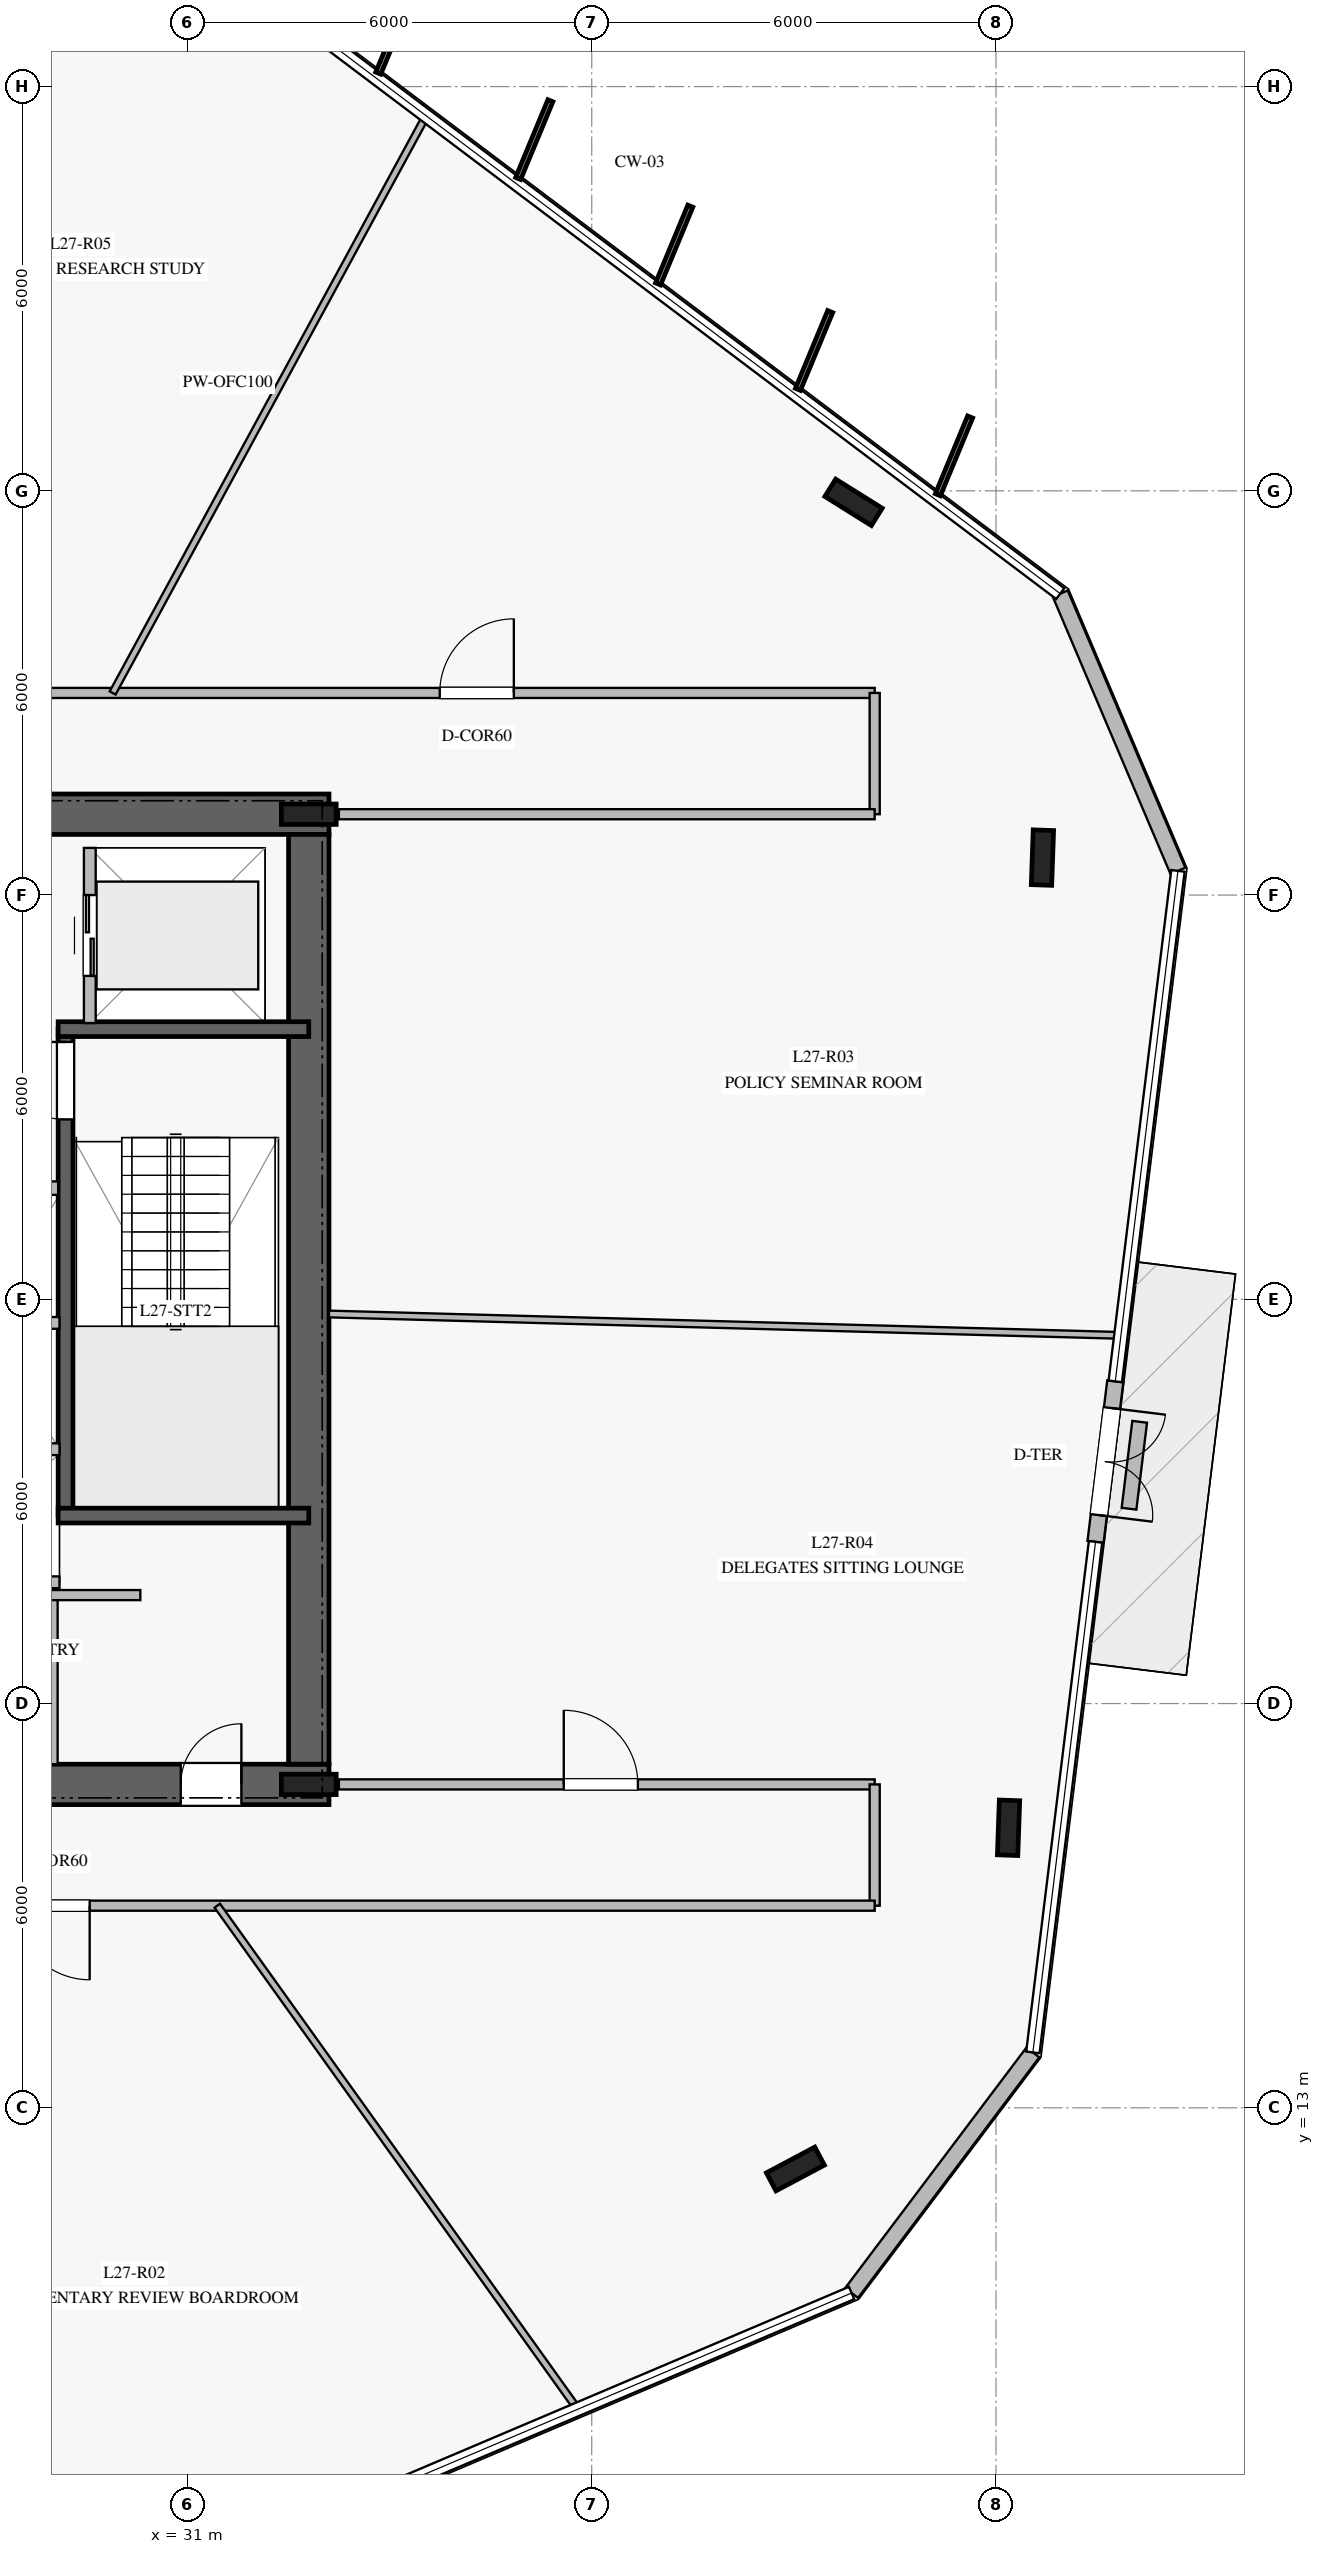
"""IFC4 building model, lengths in metres.
Left out: names, types, materials, properties, quantities, classifications, styles, units other than length and angle.
Written with IfcOpenShell. Run it as: python <this file> out.ifc"""

import sys

from ifc_helpers import new_model, si_unit, direction, frame, frame_2d, origin, origin_2d, place, context, subcontext, project, spatial, rectangle, i_section, extrude, element, fill, save


model = new_model("IFC4")
c1 = context("Model", 3, precision=1e-05, world=origin(), true_north=direction((0.0, 1.0)))
c2 = subcontext(c1, "Body", "Model", "MODEL_VIEW")
j1 = project(units=[si_unit("LENGTHUNIT", "METRE"), si_unit("PLANEANGLEUNIT", "RADIAN")], contexts=[c1])
p1 = place(None, origin())
s1 = spatial("IfcSite", under=j1, at=p1, CompositionType="ELEMENT")
p2 = place(p1, origin())
s2 = spatial("IfcBuilding", under=s1, at=p2, CompositionType="ELEMENT")
p3 = place(p2, frame((0.0, 0.0, 114.4)))
s3 = spatial("IfcBuildingStorey", under=s2, at=p3, CompositionType="ELEMENT", Elevation=114.4)
p4 = place(p3, frame((16.9, 17.8, 0.0), z_axis=(0.0, 0.0, 1.0), x_axis=(1.0, 0.0, 0.0)))
e1 = element("IfcWall", 1, at=p4, inside=s3, PredefinedType="SHEAR", context=c2, shape_type="SweptSolid", body=[
    extrude(rectangle(XDim=16.2, YDim=0.6, at=frame_2d((8.1, 0.0))), origin(), (0.0, 0.0, 1.0), 3.76),
])
p5 = place(p4, frame((5.05, 0.0, 0.0)))
e2 = element("IfcOpeningElement", 2, at=p5, cuts=e1, PredefinedType="OPENING", context=c2, shape_type="SweptSolid", body=[
    extrude(rectangle(XDim=1.2, YDim=2.25, at=frame_2d((0.6, 1.125))), frame((0.0, 0.31, 0.0), z_axis=(0.0, -1.0, 0.0), x_axis=(1.0, 0.0, 0.0)), (0.0, 0.0, 1.0), 0.62),
])
p6 = place(p4, frame((14.0, 0.0, 0.0)))
e3 = element("IfcOpeningElement", 3, at=p6, cuts=e1, PredefinedType="OPENING", context=c2, shape_type="SweptSolid", body=[
    extrude(rectangle(XDim=0.9, YDim=2.1, at=frame_2d((0.45, 1.05))), frame((0.0, 0.31, 0.0), z_axis=(0.0, -1.0, 0.0), x_axis=(1.0, 0.0, 0.0)), (0.0, 0.0, 1.0), 0.62),
])
p7 = place(p4, frame((9.25, 0.0, 0.0)))
e4 = element("IfcOpeningElement", 4, at=p7, cuts=e1, PredefinedType="OPENING", context=c2, shape_type="SweptSolid", body=[
    extrude(rectangle(XDim=1.1, YDim=2.2, at=frame_2d((0.55, 1.1))), frame((0.0, 0.31, 0.0), z_axis=(0.0, -1.0, 0.0), x_axis=(1.0, 0.0, 0.0)), (0.0, 0.0, 1.0), 0.62),
])
p8 = place(p3, frame((33.1, 32.2, 0.0), z_axis=(0.0, 0.0, 1.0), x_axis=(-1.0, 0.0, 0.0)))
e5 = element("IfcWall", 5, at=p8, inside=s3, PredefinedType="SHEAR", context=c2, shape_type="SweptSolid", body=[
    extrude(rectangle(XDim=16.2, YDim=0.6, at=frame_2d((8.1, 0.0))), origin(), (0.0, 0.0, 1.0), 3.76),
])
p9 = place(p8, frame((5.05, 0.0, 0.0)))
e6 = element("IfcOpeningElement", 6, at=p9, cuts=e5, PredefinedType="OPENING", context=c2, shape_type="SweptSolid", body=[
    extrude(rectangle(XDim=1.2, YDim=2.25, at=frame_2d((0.6, 1.125))), frame((0.0, 0.31, 0.0), z_axis=(0.0, -1.0, 0.0), x_axis=(1.0, 0.0, 0.0)), (0.0, 0.0, 1.0), 0.62),
])
p10 = place(p8, frame((11.85, 0.0, 0.0)))
e7 = element("IfcOpeningElement", 7, at=p10, cuts=e5, PredefinedType="OPENING", context=c2, shape_type="SweptSolid", body=[
    extrude(rectangle(XDim=1.1, YDim=2.2, at=frame_2d((0.55, 1.1))), frame((0.0, 0.31, 0.0), z_axis=(0.0, -1.0, 0.0), x_axis=(1.0, 0.0, 0.0)), (0.0, 0.0, 1.0), 0.62),
])
p11 = place(p8, frame((9.875, 0.0, 0.0)))
e8 = element("IfcOpeningElement", 8, at=p11, cuts=e5, PredefinedType="OPENING", context=c2, shape_type="SweptSolid", body=[
    extrude(rectangle(XDim=1.1, YDim=2.2, at=frame_2d((0.55, 1.1))), frame((0.0, 0.31, 0.0), z_axis=(0.0, -1.0, 0.0), x_axis=(1.0, 0.0, 0.0)), (0.0, 0.0, 1.0), 0.62),
])
p12 = place(p8, frame((7.9, 0.0, 0.0)))
e9 = element("IfcOpeningElement", 9, at=p12, cuts=e5, PredefinedType="OPENING", context=c2, shape_type="SweptSolid", body=[
    extrude(rectangle(XDim=1.1, YDim=2.2, at=frame_2d((0.55, 1.1))), frame((0.0, 0.31, 0.0), z_axis=(0.0, -1.0, 0.0), x_axis=(1.0, 0.0, 0.0)), (0.0, 0.0, 1.0), 0.62),
])
p13 = place(p3, frame((32.8, 18.1, 0.0), z_axis=(0.0, 0.0, 1.0), x_axis=(0.0, 1.0, 0.0)))
e10 = element("IfcWall", 10, at=p13, inside=s3, PredefinedType="SHEAR", context=c2, shape_type="SweptSolid", body=[
    extrude(rectangle(XDim=13.8, YDim=0.6, at=frame_2d((6.9, 0.0))), origin(), (0.0, 0.0, 1.0), 3.76),
])
for number, where, z_axis, x_axis in (
    (11, (32.8, 17.8, 0.0), (0.0, 0.0, 1.0), (1.0, 0.0, 0.0)),
    (12, (32.8, 32.2, 0.0), (0.0, 0.0, 1.0), (1.0, 0.0, 0.0)),
):
    element("IfcColumn", number, at=place(p3, frame(where, z_axis=z_axis, x_axis=x_axis)), inside=s3, PredefinedType="COLUMN", context=c2, shape_type="SweptSolid", body=[
        extrude(i_section(OverallWidth=0.303, OverallDepth=0.814, WebThickness=0.021, FlangeThickness=0.04, at=origin_2d()), origin(), (0.0, 0.0, 1.0), 4.0),
    ])
p14 = place(p3, frame((29.19, 21.79, 0.0), z_axis=(0.0, 0.0, 1.0), x_axis=(0.0, 1.0, 0.0)))
e13 = element("IfcWall", 13, at=p14, inside=s3, PredefinedType="SOLIDWALL", context=c2, shape_type="SweptSolid", body=[
    extrude(rectangle(XDim=7.22, YDim=0.22, at=frame_2d((3.61, 0.0))), origin(), (0.0, 0.0, 1.0), 3.76),
])
p15 = place(p14, frame((5.88, 0.0, 0.0)))
e14 = element("IfcOpeningElement", 14, at=p15, cuts=e13, PredefinedType="OPENING", context=c2, shape_type="SweptSolid", body=[
    extrude(rectangle(XDim=1.15, YDim=2.2, at=frame_2d((0.575, 1.1))), frame((0.0, 0.12, 0.0), z_axis=(0.0, -1.0, 0.0), x_axis=(1.0, 0.0, 0.0)), (0.0, 0.0, 1.0), 0.24),
])
for number, where, z_axis, x_axis in (
    (15, (29.08, 21.79, 0.0), (0.0, 0.0, 1.0), (1.0, 0.0, 0.0)),
    (16, (29.08, 29.01, 0.0), (0.0, 0.0, 1.0), (1.0, 0.0, 0.0)),
):
    element("IfcWall", number, at=place(p3, frame(where, z_axis=z_axis, x_axis=x_axis)), inside=s3, PredefinedType="SOLIDWALL", context=c2, shape_type="SweptSolid", body=[
        extrude(rectangle(XDim=3.72, YDim=0.22, at=frame_2d((1.86, 0.0))), origin(), (0.0, 0.0, 1.0), 3.76),
    ])
for number, where, z_axis, x_axis in (
    (17, (40.886, 36.829, 0.0), (0.0, 0.0, 1.0), (-0.848, 0.53, 0.0)),
    (18, (40.023, 12.092, 0.0), (0.0, 0.0, 1.0), (0.883, 0.469, 0.0)),
    (19, (43.187, 17.156, 0.0), (0.0, 0.0, 1.0), (0.035, 0.999, 0.0)),
    (20, (43.69, 31.556, 0.0), (0.0, 0.0, 1.0), (0.035, 0.999, 0.0)),
):
    element("IfcColumn", number, at=place(p3, frame(where, z_axis=z_axis, x_axis=x_axis)), inside=s3, PredefinedType="COLUMN", context=c2, shape_type="SweptSolid", body=[
        extrude(i_section(OverallWidth=0.303, OverallDepth=0.814, WebThickness=0.021, FlangeThickness=0.04, at=origin_2d()), origin(), (0.0, 0.0, 1.0), 4.0),
    ])
p16 = place(p3, frame((40.857, 10.251, 0.0), z_axis=(0.0, 0.0, 1.0), x_axis=(0.601841660076, 0.798615436989, 0.0)))
e21 = element("IfcWall", 21, at=p16, inside=s3, PredefinedType="STANDARD", context=c2, shape_type="SweptSolid", body=[
    extrude(rectangle(XDim=4.471, YDim=0.24, at=frame_2d((2.236, 0.0))), origin(), (0.0, 0.0, 1.0), 3.76),
])
p17 = place(p3, frame((44.478, 21.4, 0.0), z_axis=(0.0, 0.0, 1.0), x_axis=(0.122068869435, 0.992521632568, 0.0)))
e22 = element("IfcWall", 22, at=p17, inside=s3, PredefinedType="STANDARD", context=c2, shape_type="SweptSolid", body=[
    extrude(rectangle(XDim=2.4, YDim=0.24, at=frame_2d((1.2, 0.0))), origin(), (0.0, 0.0, 1.0), 3.76),
])
p18 = place(p17, frame((0.4, 0.0, 0.0)))
e23 = element("IfcOpeningElement", 23, at=p18, cuts=e22, PredefinedType="OPENING", context=c2, shape_type="SweptSolid", body=[
    extrude(rectangle(XDim=1.6, YDim=2.25, at=frame_2d((0.8, 1.125))), frame((0.0, 0.13, 0.0), z_axis=(0.0, -1.0, 0.0), x_axis=(1.0, 0.0, 0.0)), (0.0, 0.0, 1.0), 0.26),
])
p19 = place(p3, frame((45.701, 31.359, 0.0), z_axis=(0.0, 0.0, 1.0), x_axis=(-0.390733557702, 0.920503822309, 0.0)))
e24 = element("IfcWall", 24, at=p19, inside=s3, PredefinedType="STANDARD", context=c2, shape_type="SweptSolid", body=[
    extrude(rectangle(XDim=4.471, YDim=0.24, at=frame_2d((2.235, 0.0))), origin(), (0.0, 0.0, 1.0), 3.76),
])
p20 = place(p3, frame((44.975, 21.892, 0.0), z_axis=(0.0, 0.0, 1.0), x_axis=(0.121560078921, 0.992584075639, 0.0)))
e25 = element("IfcWall", 25, at=p20, inside=s3, PredefinedType="USERDEFINED", context=c2, shape_type="SweptSolid", body=[
    extrude(rectangle(XDim=1.299, YDim=0.22, at=frame_2d((0.65, 0.0))), origin(), (0.0, 0.0, 1.0), 0.4),
])
p21 = place(p3, frame((25.7, 26.65, 0.0), z_axis=(0.0, 0.0, 1.0), x_axis=(1.0, 0.0, 0.0)))
e26 = element("IfcWall", 26, at=p21, inside=s3, PredefinedType="PARTITIONING", context=c2, shape_type="SweptSolid", body=[
    extrude(rectangle(XDim=3.38, YDim=0.2, at=frame_2d((1.69, 0.0))), origin(), (0.0, 0.0, 1.0), 3.76),
])
p22 = place(p3, frame((29.01, 18.1, 0.0), z_axis=(0.0, 0.0, 1.0), x_axis=(0.0, 1.0, 0.0)))
e27 = element("IfcWall", 27, at=p22, inside=s3, PredefinedType="PARTITIONING", context=c2, shape_type="SweptSolid", body=[
    extrude(rectangle(XDim=2.45, YDim=0.125, at=frame_2d((1.225, 0.0))), origin(), (0.0, 0.0, 1.0), 3.76),
])
p23 = place(p3, frame((24.4, 20.61, 0.0), z_axis=(0.0, 0.0, 1.0), x_axis=(1.0, 0.0, 0.0)))
e28 = element("IfcWall", 28, at=p23, inside=s3, PredefinedType="PARTITIONING", context=c2, shape_type="SweptSolid", body=[
    extrude(rectangle(XDim=5.9, YDim=0.15, at=frame_2d((2.95, 0.0))), origin(), (0.0, 0.0, 1.0), 3.76),
])
for number, where, z_axis, x_axis in (
    (29, (26.75, 20.8, 0.0), (0.0, 0.0, 1.0), (1.0, 0.0, 0.0)),
    (30, (26.75, 22.775, 0.0), (0.0, 0.0, 1.0), (1.0, 0.0, 0.0)),
    (31, (26.75, 24.65, 0.0), (0.0, 0.0, 1.0), (1.0, 0.0, 0.0)),
):
    element("IfcWall", number, at=place(p3, frame(where, z_axis=z_axis, x_axis=x_axis)), inside=s3, PredefinedType="PARTITIONING", context=c2, shape_type="SweptSolid", body=[
        extrude(rectangle(XDim=2.35, YDim=0.175, at=frame_2d((1.175, 0.0))), origin(), (0.0, 0.0, 1.0), 3.76),
    ])
p24 = place(p3, frame((29.55, 29.1, 0.0), z_axis=(0.0, 0.0, 1.0), x_axis=(0.0, 1.0, 0.0)))
e32 = element("IfcWall", 32, at=p24, inside=s3, PredefinedType="PARTITIONING", context=c2, shape_type="SweptSolid", body=[
    extrude(rectangle(XDim=2.6, YDim=0.175, at=frame_2d((1.3, 0.0))), origin(), (0.0, 0.0, 1.0), 3.76),
])
p25 = place(p24, frame((0.7, 0.0, 0.0)))
e33 = element("IfcOpeningElement", 33, at=p25, cuts=e32, PredefinedType="OPENING", context=c2, shape_type="SweptSolid", body=[
    extrude(rectangle(XDim=1.2, YDim=2.2, at=frame_2d((0.6, 1.1))), frame((0.0, 0.098, 0.0), z_axis=(0.0, -1.0, 0.0), x_axis=(1.0, 0.0, 0.0)), (0.0, 0.0, 1.0), 0.195),
])
p26 = place(p3, frame((25.95, 34.0, 0.0), z_axis=(0.0, 0.0, 1.0), x_axis=(1.0, 0.0, 0.0)))
e34 = element("IfcWall", 34, at=p26, inside=s3, PredefinedType="PARTITIONING", context=c2, shape_type="SweptSolid", body=[
    extrude(rectangle(XDim=15.25, YDim=0.15, at=frame_2d((7.625, 0.0))), origin(), (0.0, 0.0, 1.0), 3.21),
])
p27 = place(p26, frame((8.794, 0.0, 0.0)))
e35 = element("IfcOpeningElement", 35, at=p27, cuts=e34, PredefinedType="OPENING", context=c2, shape_type="SweptSolid", body=[
    extrude(rectangle(XDim=1.1, YDim=2.2, at=frame_2d((0.55, 1.1))), frame((0.0, 0.085, 0.0), z_axis=(0.0, -1.0, 0.0), x_axis=(1.0, 0.0, 0.0)), (0.0, 0.0, 1.0), 0.17),
])
p28 = place(p3, frame((41.2, 34.0, 0.0), z_axis=(0.0, 0.0, 1.0), x_axis=(0.0, -1.0, 0.0)))
e36 = element("IfcWall", 36, at=p28, inside=s3, PredefinedType="PARTITIONING", context=c2, shape_type="SweptSolid", body=[
    extrude(rectangle(XDim=1.8, YDim=0.15, at=frame_2d((0.9, 0.0))), origin(), (0.0, 0.0, 1.0), 3.76),
])
p29 = place(p3, frame((41.2, 32.2, 0.0), z_axis=(0.0, 0.0, 1.0), x_axis=(-1.0, 0.0, 0.0)))
e37 = element("IfcWall", 37, at=p29, inside=s3, PredefinedType="PARTITIONING", context=c2, shape_type="SweptSolid", body=[
    extrude(rectangle(XDim=7.953, YDim=0.15, at=frame_2d((3.977, 0.0))), origin(), (0.0, 0.0, 1.0), 3.21),
])
p30 = place(p3, frame((33.247, 17.8, 0.0), z_axis=(0.0, 0.0, 1.0), x_axis=(1.0, 0.0, 0.0)))
e38 = element("IfcWall", 38, at=p30, inside=s3, PredefinedType="PARTITIONING", context=c2, shape_type="SweptSolid", body=[
    extrude(rectangle(XDim=7.953, YDim=0.15, at=frame_2d((3.977, 0.0))), origin(), (0.0, 0.0, 1.0), 3.05),
])
p31 = place(p30, frame((3.338, 0.0, 0.0)))
e39 = element("IfcOpeningElement", 39, at=p31, cuts=e38, PredefinedType="OPENING", context=c2, shape_type="SweptSolid", body=[
    extrude(rectangle(XDim=1.1, YDim=2.2, at=frame_2d((0.55, 1.1))), frame((0.0, 0.085, 0.0), z_axis=(0.0, -1.0, 0.0), x_axis=(1.0, 0.0, 0.0)), (0.0, 0.0, 1.0), 0.17),
])
p32 = place(p3, frame((41.2, 17.8, 0.0), z_axis=(0.0, 0.0, 1.0), x_axis=(0.0, -1.0, 0.0)))
e40 = element("IfcWall", 40, at=p32, inside=s3, PredefinedType="PARTITIONING", context=c2, shape_type="SweptSolid", body=[
    extrude(rectangle(XDim=1.8, YDim=0.15, at=frame_2d((0.9, 0.0))), origin(), (0.0, 0.0, 1.0), 3.21),
])
p33 = place(p3, frame((41.2, 16.0, 0.0), z_axis=(0.0, 0.0, 1.0), x_axis=(-1.0, 0.0, 0.0)))
e41 = element("IfcWall", 41, at=p33, inside=s3, PredefinedType="PARTITIONING", context=c2, shape_type="SweptSolid", body=[
    extrude(rectangle(XDim=15.25, YDim=0.15, at=frame_2d((7.625, 0.0))), origin(), (0.0, 0.0, 1.0), 3.21),
])
p34 = place(p33, frame((11.652, 0.0, 0.0)))
e42 = element("IfcOpeningElement", 42, at=p34, cuts=e41, PredefinedType="OPENING", context=c2, shape_type="SweptSolid", body=[
    extrude(rectangle(XDim=1.1, YDim=2.2, at=frame_2d((0.55, 1.1))), frame((0.0, 0.085, 0.0), z_axis=(0.0, -1.0, 0.0), x_axis=(1.0, 0.0, 0.0)), (0.0, 0.0, 1.0), 0.17),
])
p35 = place(p3, frame((29.889, 34.0, 0.0), z_axis=(0.0, 0.0, 1.0), x_axis=(0.477332684536, 0.878722657199, 0.0)))
e43 = element("IfcWall", 43, at=p35, inside=s3, PredefinedType="MOVABLE", context=c2, shape_type="SweptSolid", body=[
    extrude(rectangle(XDim=9.731, YDim=0.1, at=frame_2d((4.866, 0.0))), origin(), (0.0, 0.0, 1.0), 3.16),
])
p36 = place(p3, frame((31.442, 16.0, 0.0), z_axis=(0.0, 0.0, 1.0), x_axis=(0.582000725821, -0.813188265498, 0.0)))
e44 = element("IfcWall", 44, at=p36, inside=s3, PredefinedType="MOVABLE", context=c2, shape_type="SweptSolid", body=[
    extrude(rectangle(XDim=9.174, YDim=0.1, at=frame_2d((4.587, 0.0))), origin(), (0.0, 0.0, 1.0), 3.02),
])
p37 = place(p3, frame((33.1, 24.782, 0.0), z_axis=(0.0, 0.0, 1.0), x_axis=(0.999635698047, -0.026990205435, 0.0)))
e45 = element("IfcWall", 45, at=p37, inside=s3, PredefinedType="MOVABLE", context=c2, shape_type="SweptSolid", body=[
    extrude(rectangle(XDim=11.741, YDim=0.1, at=frame_2d((5.871, 0.0))), origin(), (0.0, 0.0, 1.0), 3.05),
])
p38 = place(p18, frame((1.6, 0.0, 0.0), z_axis=(0.0, 0.0, 1.0), x_axis=(-1.0, 0.0, 0.0)))
e46 = element("IfcDoor", 46, at=p38, inside=s3, OperationType="DOUBLE_DOOR_SINGLE_SWING", PredefinedType="DOOR", context=c2, shape_type="SweptSolid", body=[
    extrude(rectangle(XDim=1.6, YDim=2.25, at=frame_2d((0.8, 1.125))), frame((0.0, 0.025, 0.0), z_axis=(0.0, -1.0, 0.0), x_axis=(1.0, 0.0, 0.0)), (0.0, 0.0, 1.0), 0.05),
])
fill(e23, e46)
p39 = place(p15, origin())
e47 = element("IfcDoor", 47, at=p39, inside=s3, OperationType="SINGLE_SWING_RIGHT", PredefinedType="DOOR", context=c2, shape_type="SweptSolid", body=[
    extrude(rectangle(XDim=1.15, YDim=2.2, at=frame_2d((0.575, 1.1))), frame((0.0, 0.025, 0.0), z_axis=(0.0, -1.0, 0.0), x_axis=(1.0, 0.0, 0.0)), (0.0, 0.0, 1.0), 0.05),
])
fill(e14, e47)
p40 = place(p6, origin())
e48 = element("IfcDoor", 48, at=p40, inside=s3, OperationType="SINGLE_SWING_RIGHT", PredefinedType="DOOR", context=c2, shape_type="SweptSolid", body=[
    extrude(rectangle(XDim=0.9, YDim=2.1, at=frame_2d((0.45, 1.05))), frame((0.0, 0.025, 0.0), z_axis=(0.0, -1.0, 0.0), x_axis=(1.0, 0.0, 0.0)), (0.0, 0.0, 1.0), 0.05),
])
fill(e3, e48)
p41 = place(p25, origin())
e49 = element("IfcDoor", 49, at=p41, inside=s3, OperationType="DOUBLE_DOOR_SLIDING", PredefinedType="DOOR", context=c2, shape_type="SweptSolid", body=[
    extrude(rectangle(XDim=1.2, YDim=2.2, at=frame_2d((0.6, 1.1))), frame((0.0, 0.025, 0.0), z_axis=(0.0, -1.0, 0.0), x_axis=(1.0, 0.0, 0.0)), (0.0, 0.0, 1.0), 0.05),
])
fill(e33, e49)
p42 = place(p34, origin())
e50 = element("IfcDoor", 50, at=p42, inside=s3, OperationType="SINGLE_SWING_LEFT", PredefinedType="DOOR", context=c2, shape_type="SweptSolid", body=[
    extrude(rectangle(XDim=1.1, YDim=2.2, at=frame_2d((0.55, 1.1))), frame((0.0, 0.025, 0.0), z_axis=(0.0, -1.0, 0.0), x_axis=(1.0, 0.0, 0.0)), (0.0, 0.0, 1.0), 0.05),
])
fill(e42, e50)
p43 = place(p27, origin())
e51 = element("IfcDoor", 51, at=p43, inside=s3, OperationType="SINGLE_SWING_RIGHT", PredefinedType="DOOR", context=c2, shape_type="SweptSolid", body=[
    extrude(rectangle(XDim=1.1, YDim=2.2, at=frame_2d((0.55, 1.1))), frame((0.0, 0.025, 0.0), z_axis=(0.0, -1.0, 0.0), x_axis=(1.0, 0.0, 0.0)), (0.0, 0.0, 1.0), 0.05),
])
fill(e35, e51)
p44 = place(p31, origin())
e52 = element("IfcDoor", 52, at=p44, inside=s3, OperationType="SINGLE_SWING_LEFT", PredefinedType="DOOR", context=c2, shape_type="SweptSolid", body=[
    extrude(rectangle(XDim=1.1, YDim=2.2, at=frame_2d((0.55, 1.1))), frame((0.0, 0.025, 0.0), z_axis=(0.0, -1.0, 0.0), x_axis=(1.0, 0.0, 0.0)), (0.0, 0.0, 1.0), 0.05),
])
fill(e39, e52)
save(model, sys.argv[1])
